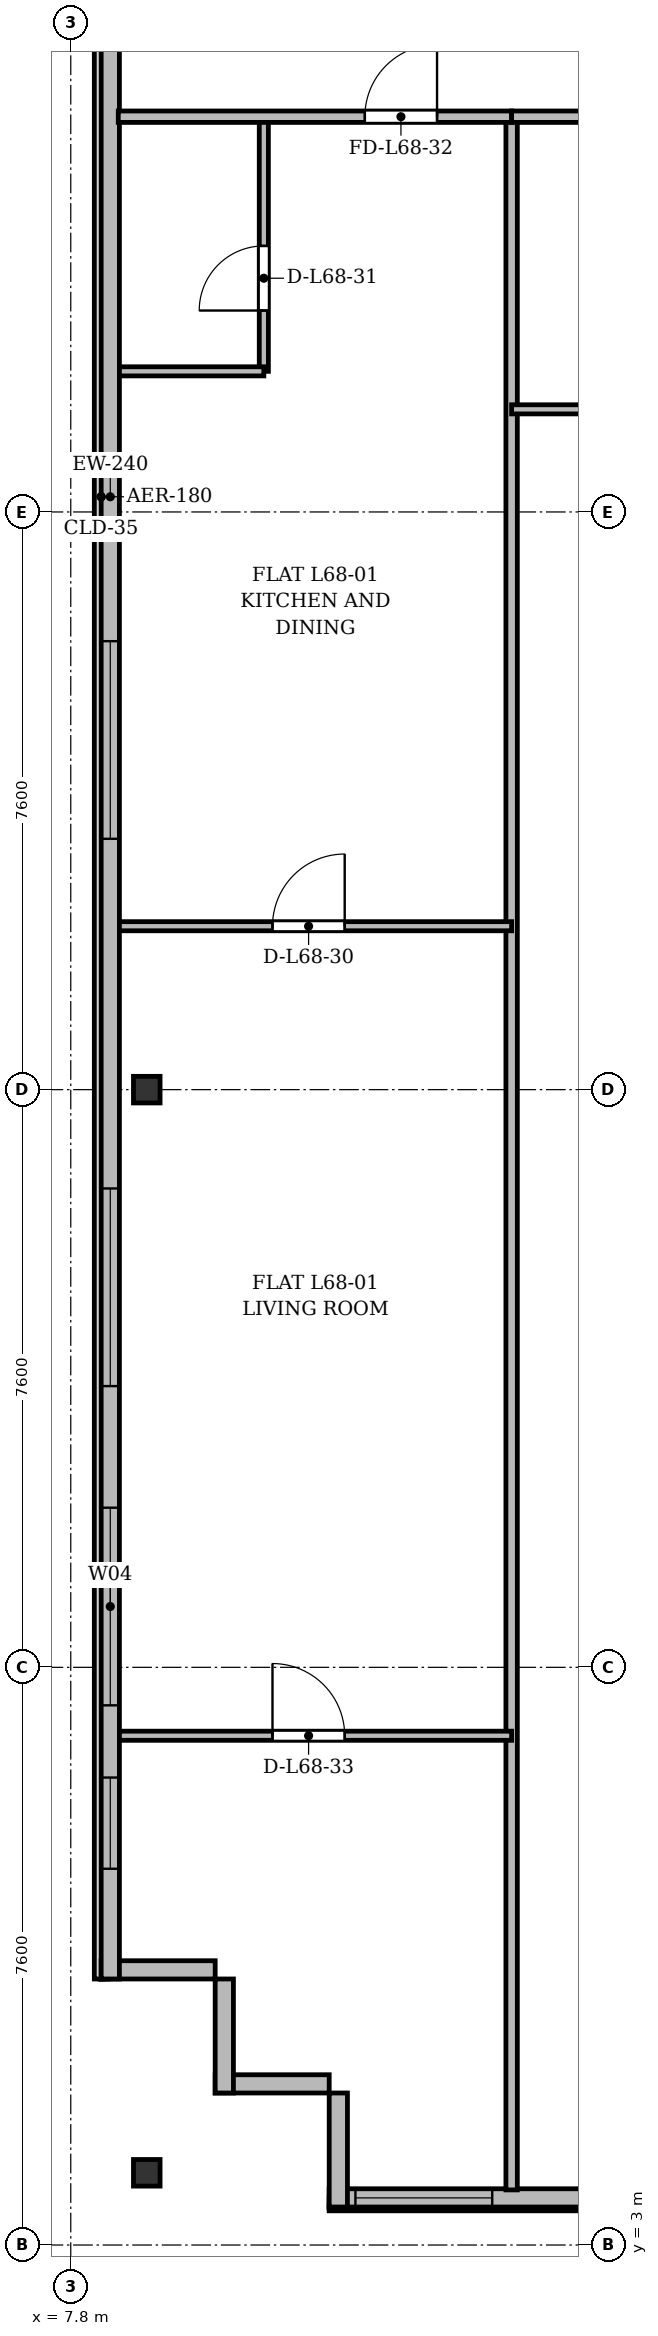
"""IFC4 building model, lengths in metres.
Left out: names, types, materials, properties, quantities, classifications, styles, units other than length and angle.
Written with IfcOpenShell. Run it as: python <this file> out.ifc"""

import sys

from ifc_helpers import new_model, si_unit, direction, frame, frame_2d, origin, origin_2d, place, context, subcontext, project, spatial, rectangle, i_section, extrude, source, transform, mapped, element, fill, save


model = new_model("IFC4")
c1 = context("Model", 3, precision=1e-05, world=origin(), true_north=direction((0.0, 1.0)))
c2 = subcontext(c1, "Body", "Model", "MODEL_VIEW")
j1 = project(units=[si_unit("LENGTHUNIT", "METRE"), si_unit("PLANEANGLEUNIT", "RADIAN")], contexts=[c1])
p1 = place(None, origin())
s1 = spatial("IfcSite", under=j1, at=p1, CompositionType="ELEMENT")
p2 = place(p1, origin())
s2 = spatial("IfcBuilding", under=s1, at=p2, CompositionType="ELEMENT")
p3 = place(p2, frame((0.0, 0.0, 263.1)))
s3 = spatial("IfcBuildingStorey", under=s2, at=p3, CompositionType="ELEMENT", Elevation=263.1)
m1 = source(origin(), c2, "Body", "SweptSolid", [
    extrude(i_section(OverallWidth=0.35, OverallDepth=0.35, WebThickness=0.018, FlangeThickness=0.028, at=origin_2d()), origin(), (0.0, 0.0, 1.0), 3.6),
])
for number, where, z_axis, x_axis in (
    (1, (8.8, 3.95, 0.0), (0.0, 0.0, 1.0), (1.0, 0.0, 0.0)),
    (2, (8.8, 18.2, 0.0), (0.0, 0.0, 1.0), (1.0, 0.0, 0.0)),
):
    element("IfcColumn", number, at=place(p3, frame(where, z_axis=z_axis, x_axis=x_axis)), inside=s3, PredefinedType="COLUMN", context=c2, shape_type="MappedRepresentation", body=[
        mapped(m1, transform((0.0, 0.0, 0.0), x_axis=(1.0, 0.0, 0.0), y_axis=(0.0, 1.0, 0.0), z_axis=(0.0, 0.0, 1.0), scale=1.0)),
    ])
for number, where, z_axis, x_axis in (
    (3, (11.2, 5.12, 0.0), (0.0, 0.0, 1.0), (-1.0, 0.0, 0.0)),
    (4, (9.82, 5.0, 0.0), (0.0, 0.0, 1.0), (0.0, 1.0, 0.0)),
):
    element("IfcWall", number, at=place(p3, frame(where, z_axis=z_axis, x_axis=x_axis)), inside=s3, PredefinedType="SOLIDWALL", context=c2, shape_type="SweptSolid", body=[
        extrude(rectangle(XDim=1.5, YDim=0.24, at=frame_2d((0.75, 0.0))), origin(), (0.0, 0.0, 1.0), 3.37),
    ])
p4 = place(p3, frame((9.7, 6.62, 0.0), z_axis=(0.0, 0.0, 1.0), x_axis=(-1.0, 0.0, 0.0)))
e5 = element("IfcWall", 5, at=p4, inside=s3, PredefinedType="SOLIDWALL", context=c2, shape_type="SweptSolid", body=[
    extrude(rectangle(XDim=1.5, YDim=0.24, at=frame_2d((0.75, 0.0))), origin(), (0.0, 0.0, 1.0), 2.87),
])
p5 = place(p3, frame((8.32, 6.5, 0.0), z_axis=(0.0, 0.0, 1.0), x_axis=(0.0, 1.0, 0.0)))
e6 = element("IfcWall", 6, at=p5, inside=s3, PredefinedType="SOLIDWALL", context=c2, shape_type="SweptSolid", body=[
    extrude(rectangle(XDim=39.0, YDim=0.24, at=frame_2d((19.5, 0.0))), origin(), (0.0, 0.0, 1.0), 3.37),
])
p6 = place(p5, frame((1.45, 0.0, 0.92)))
e7 = element("IfcOpeningElement", 7, at=p6, cuts=e6, PredefinedType="OPENING", context=c2, shape_type="SweptSolid", body=[
    extrude(rectangle(XDim=1.2, YDim=1.65, at=frame_2d((0.6, 0.825))), frame((0.0, 0.13, 0.0), z_axis=(0.0, -1.0, 0.0), x_axis=(1.0, 0.0, 0.0)), (0.0, 0.0, 1.0), 0.26),
])
p7 = place(p5, frame((3.6, 0.0, 0.92)))
e8 = element("IfcOpeningElement", 8, at=p7, cuts=e6, PredefinedType="OPENING", context=c2, shape_type="SweptSolid", body=[
    extrude(rectangle(XDim=2.6, YDim=1.9, at=frame_2d((1.3, 0.95))), frame((0.0, 0.13, 0.0), z_axis=(0.0, -1.0, 0.0), x_axis=(1.0, 0.0, 0.0)), (0.0, 0.0, 1.0), 0.26),
])
p8 = place(p5, frame((7.8, 0.0, 0.92)))
e9 = element("IfcOpeningElement", 9, at=p8, cuts=e6, PredefinedType="OPENING", context=c2, shape_type="SweptSolid", body=[
    extrude(rectangle(XDim=2.6, YDim=1.9, at=frame_2d((1.3, 0.95))), frame((0.0, 0.13, 0.0), z_axis=(0.0, -1.0, 0.0), x_axis=(1.0, 0.0, 0.0)), (0.0, 0.0, 1.0), 0.26),
])
p9 = place(p5, frame((15.0, 0.0, 0.92)))
e10 = element("IfcOpeningElement", 10, at=p9, cuts=e6, PredefinedType="OPENING", context=c2, shape_type="SweptSolid", body=[
    extrude(rectangle(XDim=2.6, YDim=1.9, at=frame_2d((1.3, 0.95))), frame((0.0, 0.13, 0.0), z_axis=(0.0, -1.0, 0.0), x_axis=(1.0, 0.0, 0.0)), (0.0, 0.0, 1.0), 0.26),
])
p10 = place(p5, frame((33.3, 0.0, 0.92)))
e11 = element("IfcOpeningElement", 11, at=p10, cuts=e6, PredefinedType="OPENING", context=c2, shape_type="SweptSolid", body=[
    extrude(rectangle(XDim=1.2, YDim=1.65, at=frame_2d((0.6, 0.825))), frame((0.0, 0.13, 0.0), z_axis=(0.0, -1.0, 0.0), x_axis=(1.0, 0.0, 0.0)), (0.0, 0.0, 1.0), 0.26),
])
p11 = place(p5, frame((36.65, 0.0, 0.92)))
e12 = element("IfcOpeningElement", 12, at=p11, cuts=e6, PredefinedType="OPENING", context=c2, shape_type="SweptSolid", body=[
    extrude(rectangle(XDim=1.2, YDim=1.65, at=frame_2d((0.6, 0.825))), frame((0.0, 0.13, 0.0), z_axis=(0.0, -1.0, 0.0), x_axis=(1.0, 0.0, 0.0)), (0.0, 0.0, 1.0), 0.26),
])
p12 = place(p3, frame((63.2, 3.62, 0.0), z_axis=(0.0, 0.0, 1.0), x_axis=(-1.0, 0.0, 0.0)))
e13 = element("IfcWall", 13, at=p12, inside=s3, PredefinedType="SOLIDWALL", context=c2, shape_type="SweptSolid", body=[
    extrude(rectangle(XDim=52.0, YDim=0.24, at=frame_2d((26.0, 0.0))), origin(), (0.0, 0.0, 1.0), 3.37),
])
p13 = place(p12, frame((0.345, 0.0, 0.9)))
e14 = element("IfcOpeningElement", 14, at=p13, cuts=e13, PredefinedType="OPENING", context=c2, shape_type="SweptSolid", body=[
    extrude(rectangle(XDim=1.2, YDim=1.65, at=frame_2d((0.6, 0.825))), frame((0.0, 0.13, 0.0), z_axis=(0.0, -1.0, 0.0), x_axis=(1.0, 0.0, 0.0)), (0.0, 0.0, 1.0), 0.26),
])
p14 = place(p12, frame((2.225, 0.0, 0.9)))
e15 = element("IfcOpeningElement", 15, at=p14, cuts=e13, PredefinedType="OPENING", context=c2, shape_type="SweptSolid", body=[
    extrude(rectangle(XDim=1.65, YDim=1.85, at=frame_2d((0.825, 0.925))), frame((0.0, 0.13, 0.0), z_axis=(0.0, -1.0, 0.0), x_axis=(1.0, 0.0, 0.0)), (0.0, 0.0, 1.0), 0.26),
])
p15 = place(p12, frame((5.42, 0.0, 0.0)))
e16 = element("IfcOpeningElement", 16, at=p15, cuts=e13, PredefinedType="OPENING", context=c2, shape_type="SweptSolid", body=[
    extrude(rectangle(XDim=1.2, YDim=2.2, at=frame_2d((0.6, 1.1))), frame((0.0, 0.13, 0.0), z_axis=(0.0, -1.0, 0.0), x_axis=(1.0, 0.0, 0.0)), (0.0, 0.0, 1.0), 0.26),
])
p16 = place(p12, frame((8.4, 0.0, 0.9)))
e17 = element("IfcOpeningElement", 17, at=p16, cuts=e13, PredefinedType="OPENING", context=c2, shape_type="SweptSolid", body=[
    extrude(rectangle(XDim=2.2, YDim=1.8, at=frame_2d((1.1, 0.9))), frame((0.0, 0.13, 0.0), z_axis=(0.0, -1.0, 0.0), x_axis=(1.0, 0.0, 0.0)), (0.0, 0.0, 1.0), 0.26),
])
p17 = place(p12, frame((15.05, 0.0, 0.9)))
e18 = element("IfcOpeningElement", 18, at=p17, cuts=e13, PredefinedType="OPENING", context=c2, shape_type="SweptSolid", body=[
    extrude(rectangle(XDim=1.5, YDim=1.75, at=frame_2d((0.75, 0.875))), frame((0.0, 0.13, 0.0), z_axis=(0.0, -1.0, 0.0), x_axis=(1.0, 0.0, 0.0)), (0.0, 0.0, 1.0), 0.26),
])
p18 = place(p12, frame((20.25, 0.0, 0.9)))
e19 = element("IfcOpeningElement", 19, at=p18, cuts=e13, PredefinedType="OPENING", context=c2, shape_type="SweptSolid", body=[
    extrude(rectangle(XDim=2.0, YDim=1.95, at=frame_2d((1.0, 0.975))), frame((0.0, 0.13, 0.0), z_axis=(0.0, -1.0, 0.0), x_axis=(1.0, 0.0, 0.0)), (0.0, 0.0, 1.0), 0.26),
])
p19 = place(p12, frame((24.125, 0.0, 0.9)))
e20 = element("IfcOpeningElement", 20, at=p19, cuts=e13, PredefinedType="OPENING", context=c2, shape_type="SweptSolid", body=[
    extrude(rectangle(XDim=1.65, YDim=1.85, at=frame_2d((0.825, 0.925))), frame((0.0, 0.13, 0.0), z_axis=(0.0, -1.0, 0.0), x_axis=(1.0, 0.0, 0.0)), (0.0, 0.0, 1.0), 0.26),
])
p20 = place(p12, frame((28.8, 0.0, 0.9)))
e21 = element("IfcOpeningElement", 21, at=p20, cuts=e13, PredefinedType="OPENING", context=c2, shape_type="SweptSolid", body=[
    extrude(rectangle(XDim=1.8, YDim=1.8, at=frame_2d((0.9, 0.9))), frame((0.0, 0.13, 0.0), z_axis=(0.0, -1.0, 0.0), x_axis=(1.0, 0.0, 0.0)), (0.0, 0.0, 1.0), 0.26),
])
p21 = place(p12, frame((34.078, 0.0, 0.0)))
e22 = element("IfcOpeningElement", 22, at=p21, cuts=e13, PredefinedType="OPENING", context=c2, shape_type="SweptSolid", body=[
    extrude(rectangle(XDim=1.2, YDim=2.2, at=frame_2d((0.6, 1.1))), frame((0.0, 0.13, 0.0), z_axis=(0.0, -1.0, 0.0), x_axis=(1.0, 0.0, 0.0)), (0.0, 0.0, 1.0), 0.26),
])
p22 = place(p12, frame((37.25, 0.0, 0.9)))
e23 = element("IfcOpeningElement", 23, at=p22, cuts=e13, PredefinedType="OPENING", context=c2, shape_type="SweptSolid", body=[
    extrude(rectangle(XDim=1.5, YDim=1.75, at=frame_2d((0.75, 0.875))), frame((0.0, 0.13, 0.0), z_axis=(0.0, -1.0, 0.0), x_axis=(1.0, 0.0, 0.0)), (0.0, 0.0, 1.0), 0.26),
])
p23 = place(p12, frame((40.9, 0.0, 0.9)))
e24 = element("IfcOpeningElement", 24, at=p23, cuts=e13, PredefinedType="OPENING", context=c2, shape_type="SweptSolid", body=[
    extrude(rectangle(XDim=2.0, YDim=1.95, at=frame_2d((1.0, 0.975))), frame((0.0, 0.13, 0.0), z_axis=(0.0, -1.0, 0.0), x_axis=(1.0, 0.0, 0.0)), (0.0, 0.0, 1.0), 0.26),
])
p24 = place(p12, frame((44.19, 0.0, 0.9)))
e25 = element("IfcOpeningElement", 25, at=p24, cuts=e13, PredefinedType="OPENING", context=c2, shape_type="SweptSolid", body=[
    extrude(rectangle(XDim=1.65, YDim=1.85, at=frame_2d((0.825, 0.925))), frame((0.0, 0.13, 0.0), z_axis=(0.0, -1.0, 0.0), x_axis=(1.0, 0.0, 0.0)), (0.0, 0.0, 1.0), 0.26),
])
p25 = place(p12, frame((49.855, 0.0, 0.9)))
e26 = element("IfcOpeningElement", 26, at=p25, cuts=e13, PredefinedType="OPENING", context=c2, shape_type="SweptSolid", body=[
    extrude(rectangle(XDim=1.8, YDim=1.8, at=frame_2d((0.9, 0.9))), frame((0.0, 0.13, 0.0), z_axis=(0.0, -1.0, 0.0), x_axis=(1.0, 0.0, 0.0)), (0.0, 0.0, 1.0), 0.26),
])
p26 = place(p3, frame((11.32, 3.5, 0.0), z_axis=(0.0, 0.0, 1.0), x_axis=(0.0, 1.0, 0.0)))
e27 = element("IfcWall", 27, at=p26, inside=s3, PredefinedType="SOLIDWALL", context=c2, shape_type="SweptSolid", body=[
    extrude(rectangle(XDim=1.5, YDim=0.24, at=frame_2d((0.75, 0.0))), origin(), (0.0, 0.0, 1.0), 2.92),
])
p27 = place(p3, frame((13.6, 3.725, 0.0), z_axis=(0.0, 0.0, 1.0), x_axis=(0.0, 1.0, 0.0)))
e28 = element("IfcWall", 28, at=p27, inside=s3, PredefinedType="PARTITIONING", context=c2, shape_type="SweptSolid", body=[
    extrude(rectangle(XDim=27.275, YDim=0.15, at=frame_2d((13.637, 0.0))), origin(), (0.0, 0.0, 1.0), 2.92),
])
p28 = place(p3, frame((8.44, 20.35, 0.0), z_axis=(0.0, 0.0, 1.0), x_axis=(1.0, 0.0, 0.0)))
e29 = element("IfcWall", 29, at=p28, inside=s3, PredefinedType="PARTITIONING", context=c2, shape_type="SweptSolid", body=[
    extrude(rectangle(XDim=5.16, YDim=0.12, at=frame_2d((2.58, 0.0))), origin(), (0.0, 0.0, 1.0), 2.87),
])
p29 = place(p28, frame((2.014, 0.0, 0.0)))
e30 = element("IfcOpeningElement", 30, at=p29, cuts=e29, PredefinedType="OPENING", context=c2, shape_type="SweptSolid", body=[
    extrude(rectangle(XDim=0.95, YDim=2.15, at=frame_2d((0.475, 1.075))), frame((0.0, 0.07, 0.0), z_axis=(0.0, -1.0, 0.0), x_axis=(1.0, 0.0, 0.0)), (0.0, 0.0, 1.0), 0.14),
])
p30 = place(p3, frame((10.34, 27.65, 0.0), z_axis=(0.0, 0.0, 1.0), x_axis=(0.0, 1.0, 0.0)))
e31 = element("IfcWall", 31, at=p30, inside=s3, PredefinedType="PARTITIONING", context=c2, shape_type="SweptSolid", body=[
    extrude(rectangle(XDim=3.35, YDim=0.12, at=frame_2d((1.675, 0.0))), origin(), (0.0, 0.0, 1.0), 3.37),
])
p31 = place(p30, frame((0.8, 0.0, 0.0)))
e32 = element("IfcOpeningElement", 32, at=p31, cuts=e31, PredefinedType="OPENING", context=c2, shape_type="SweptSolid", body=[
    extrude(rectangle(XDim=0.85, YDim=2.1, at=frame_2d((0.425, 1.05))), frame((0.0, 0.07, 0.0), z_axis=(0.0, -1.0, 0.0), x_axis=(1.0, 0.0, 0.0)), (0.0, 0.0, 1.0), 0.14),
])
p32 = place(p3, frame((8.44, 27.65, 0.0), z_axis=(0.0, 0.0, 1.0), x_axis=(1.0, 0.0, 0.0)))
e33 = element("IfcWall", 33, at=p32, inside=s3, PredefinedType="PARTITIONING", context=c2, shape_type="SweptSolid", body=[
    extrude(rectangle(XDim=1.9, YDim=0.12, at=frame_2d((0.95, 0.0))), origin(), (0.0, 0.0, 1.0), 2.87),
])
p33 = place(p3, frame((8.425, 31.0, 0.0), z_axis=(0.0, 0.0, 1.0), x_axis=(1.0, 0.0, 0.0)))
e34 = element("IfcWall", 34, at=p33, inside=s3, PredefinedType="PARTITIONING", context=c2, shape_type="SweptSolid", body=[
    extrude(rectangle(XDim=5.175, YDim=0.15, at=frame_2d((2.587, 0.0))), origin(), (0.0, 0.0, 1.0), 2.87),
])
p34 = place(p33, frame((3.244, 0.0, 0.0)))
e35 = element("IfcOpeningElement", 35, at=p34, cuts=e34, PredefinedType="OPENING", context=c2, shape_type="SweptSolid", body=[
    extrude(rectangle(XDim=0.95, YDim=2.15, at=frame_2d((0.475, 1.075))), frame((0.0, 0.085, 0.0), z_axis=(0.0, -1.0, 0.0), x_axis=(1.0, 0.0, 0.0)), (0.0, 0.0, 1.0), 0.17),
])
p35 = place(p3, frame((8.44, 9.7, 0.0), z_axis=(0.0, 0.0, 1.0), x_axis=(1.0, 0.0, 0.0)))
e36 = element("IfcWall", 36, at=p35, inside=s3, PredefinedType="PARTITIONING", context=c2, shape_type="SweptSolid", body=[
    extrude(rectangle(XDim=5.16, YDim=0.12, at=frame_2d((2.58, 0.0))), origin(), (0.0, 0.0, 1.0), 2.87),
])
p36 = place(p35, frame((2.014, 0.0, 0.0)))
e37 = element("IfcOpeningElement", 37, at=p36, cuts=e36, PredefinedType="OPENING", context=c2, shape_type="SweptSolid", body=[
    extrude(rectangle(XDim=0.95, YDim=2.15, at=frame_2d((0.475, 1.075))), frame((0.0, 0.07, 0.0), z_axis=(0.0, -1.0, 0.0), x_axis=(1.0, 0.0, 0.0)), (0.0, 0.0, 1.0), 0.14),
])
p37 = place(p3, frame((13.6, 31.0, 0.0), z_axis=(0.0, 0.0, 1.0), x_axis=(1.0, 0.0, 0.0)))
e38 = element("IfcWall", 38, at=p37, inside=s3, PredefinedType="PARTITIONING", context=c2, shape_type="SweptSolid", body=[
    extrude(rectangle(XDim=5.6, YDim=0.15, at=frame_2d((2.8, 0.0))), origin(), (0.0, 0.0, 1.0), 2.87),
])
p38 = place(p37, frame((2.232, 0.0, 0.0)))
e39 = element("IfcOpeningElement", 39, at=p38, cuts=e38, PredefinedType="OPENING", context=c2, shape_type="SweptSolid", body=[
    extrude(rectangle(XDim=0.95, YDim=2.15, at=frame_2d((0.475, 1.075))), frame((0.0, 0.085, 0.0), z_axis=(0.0, -1.0, 0.0), x_axis=(1.0, 0.0, 0.0)), (0.0, 0.0, 1.0), 0.17),
])
p39 = place(p3, frame((13.6, 27.15, 0.0), z_axis=(0.0, 0.0, 1.0), x_axis=(1.0, 0.0, 0.0)))
e40 = element("IfcWall", 40, at=p39, inside=s3, PredefinedType="PARTITIONING", context=c2, shape_type="SweptSolid", body=[
    extrude(rectangle(XDim=5.6, YDim=0.12, at=frame_2d((2.8, 0.0))), origin(), (0.0, 0.0, 1.0), 2.87),
])
p40 = place(p39, frame((2.232, 0.0, 0.0)))
e41 = element("IfcOpeningElement", 41, at=p40, cuts=e40, PredefinedType="OPENING", context=c2, shape_type="SweptSolid", body=[
    extrude(rectangle(XDim=0.95, YDim=2.15, at=frame_2d((0.475, 1.075))), frame((0.0, 0.07, 0.0), z_axis=(0.0, -1.0, 0.0), x_axis=(1.0, 0.0, 0.0)), (0.0, 0.0, 1.0), 0.14),
])
m2 = source(origin(), c2, "Body", "SweptSolid", [
    extrude(rectangle(XDim=1.2, YDim=1.65, at=frame_2d((0.6, 0.825))), frame((0.0, 0.03, 0.0), z_axis=(0.0, -1.0, 0.0), x_axis=(1.0, 0.0, 0.0)), (0.0, 0.0, 1.0), 0.06),
])
p41 = place(p6, origin())
e42 = element("IfcWindow", 42, at=p41, inside=s3, PartitioningType="SINGLE_PANEL", PredefinedType="WINDOW", context=c2, shape_type="MappedRepresentation", body=[
    mapped(m2, transform((0.0, 0.0, 0.0), x_axis=(1.0, 0.0, 0.0), y_axis=(0.0, 1.0, 0.0), z_axis=(0.0, 0.0, 1.0), scale=1.0)),
])
fill(e7, e42)
m3 = source(origin(), c2, "Body", "SweptSolid", [
    extrude(rectangle(XDim=2.6, YDim=1.9, at=frame_2d((1.3, 0.95))), frame((0.0, 0.03, 0.0), z_axis=(0.0, -1.0, 0.0), x_axis=(1.0, 0.0, 0.0)), (0.0, 0.0, 1.0), 0.06),
])
p42 = place(p7, origin())
e43 = element("IfcWindow", 43, at=p42, inside=s3, PartitioningType="SINGLE_PANEL", PredefinedType="WINDOW", context=c2, shape_type="MappedRepresentation", body=[
    mapped(m3, transform((0.0, 0.0, 0.0), x_axis=(1.0, 0.0, 0.0), y_axis=(0.0, 1.0, 0.0), z_axis=(0.0, 0.0, 1.0), scale=1.0)),
])
fill(e8, e43)
p43 = place(p8, origin())
e44 = element("IfcWindow", 44, at=p43, inside=s3, PartitioningType="SINGLE_PANEL", PredefinedType="WINDOW", context=c2, shape_type="MappedRepresentation", body=[
    mapped(m3, transform((0.0, 0.0, 0.0), x_axis=(1.0, 0.0, 0.0), y_axis=(0.0, 1.0, 0.0), z_axis=(0.0, 0.0, 1.0), scale=1.0)),
])
fill(e9, e44)
p44 = place(p9, origin())
e45 = element("IfcWindow", 45, at=p44, inside=s3, PartitioningType="SINGLE_PANEL", PredefinedType="WINDOW", context=c2, shape_type="MappedRepresentation", body=[
    mapped(m3, transform((0.0, 0.0, 0.0), x_axis=(1.0, 0.0, 0.0), y_axis=(0.0, 1.0, 0.0), z_axis=(0.0, 0.0, 1.0), scale=1.0)),
])
fill(e10, e45)
m4 = source(origin(), c2, "Body", "SweptSolid", [
    extrude(rectangle(XDim=1.8, YDim=1.8, at=frame_2d((0.9, 0.9))), frame((0.0, 0.03, 0.0), z_axis=(0.0, -1.0, 0.0), x_axis=(1.0, 0.0, 0.0)), (0.0, 0.0, 1.0), 0.06),
])
p45 = place(p25, origin())
e46 = element("IfcWindow", 46, at=p45, inside=s3, PartitioningType="SINGLE_PANEL", PredefinedType="WINDOW", context=c2, shape_type="MappedRepresentation", body=[
    mapped(m4, transform((0.0, 0.0, 0.0), x_axis=(1.0, 0.0, 0.0), y_axis=(0.0, 1.0, 0.0), z_axis=(0.0, 0.0, 1.0), scale=1.0)),
])
fill(e26, e46)
m5 = source(origin(), c2, "Body", "SweptSolid", [
    extrude(rectangle(XDim=0.95, YDim=2.15, at=frame_2d((0.475, 1.075))), frame((0.0, 0.025, 0.0), z_axis=(0.0, -1.0, 0.0), x_axis=(1.0, 0.0, 0.0)), (0.0, 0.0, 1.0), 0.05),
])
p46 = place(p29, origin())
e47 = element("IfcDoor", 47, at=p46, inside=s3, OperationType="SINGLE_SWING_RIGHT", PredefinedType="DOOR", context=c2, shape_type="MappedRepresentation", body=[
    mapped(m5, transform((0.0, 0.0, 0.0), x_axis=(1.0, 0.0, 0.0), y_axis=(0.0, 1.0, 0.0), z_axis=(0.0, 0.0, 1.0), scale=1.0)),
])
fill(e30, e47)
m6 = source(origin(), c2, "Body", "SweptSolid", [
    extrude(rectangle(XDim=0.85, YDim=2.1, at=frame_2d((0.425, 1.05))), frame((0.0, 0.025, 0.0), z_axis=(0.0, -1.0, 0.0), x_axis=(1.0, 0.0, 0.0)), (0.0, 0.0, 1.0), 0.05),
])
p47 = place(p31, origin())
e48 = element("IfcDoor", 48, at=p47, inside=s3, OperationType="SINGLE_SWING_LEFT", PredefinedType="DOOR", context=c2, shape_type="MappedRepresentation", body=[
    mapped(m6, transform((0.0, 0.0, 0.0), x_axis=(1.0, 0.0, 0.0), y_axis=(0.0, 1.0, 0.0), z_axis=(0.0, 0.0, 1.0), scale=1.0)),
])
fill(e32, e48)
p48 = place(p34, origin())
e49 = element("IfcDoor", 49, at=p48, inside=s3, OperationType="SINGLE_SWING_RIGHT", PredefinedType="DOOR", context=c2, shape_type="MappedRepresentation", body=[
    mapped(m5, transform((0.0, 0.0, 0.0), x_axis=(1.0, 0.0, 0.0), y_axis=(0.0, 1.0, 0.0), z_axis=(0.0, 0.0, 1.0), scale=1.0)),
])
fill(e35, e49)
p49 = place(p36, origin())
e50 = element("IfcDoor", 50, at=p49, inside=s3, OperationType="SINGLE_SWING_LEFT", PredefinedType="DOOR", context=c2, shape_type="MappedRepresentation", body=[
    mapped(m5, transform((0.0, 0.0, 0.0), x_axis=(1.0, 0.0, 0.0), y_axis=(0.0, 1.0, 0.0), z_axis=(0.0, 0.0, 1.0), scale=1.0)),
])
fill(e37, e50)
save(model, sys.argv[1])
